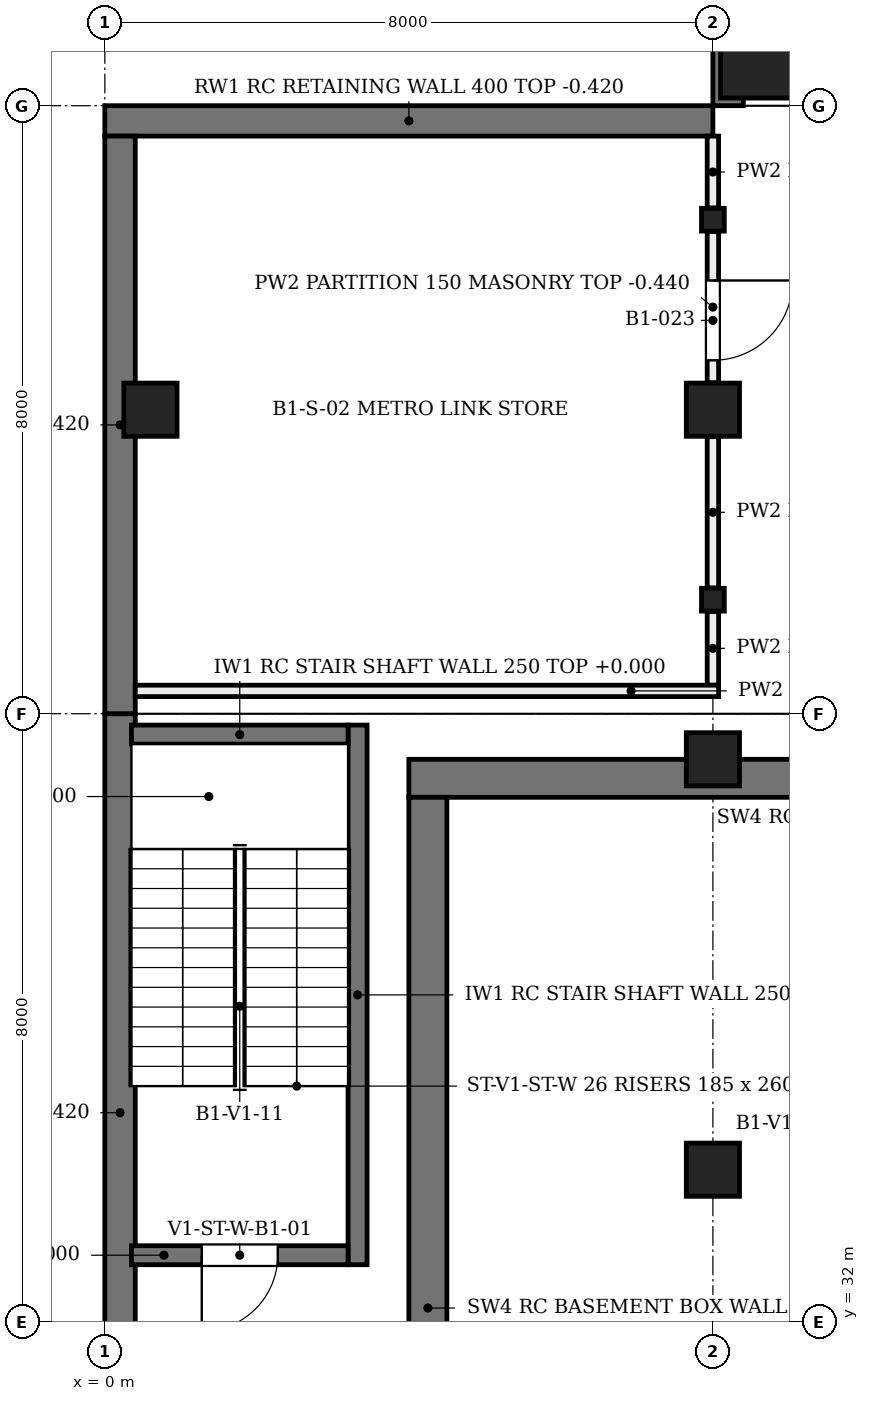
"""IFC4 building model, lengths in metres.
Left out: names, types, materials, properties, quantities, classifications, styles, units other than length and angle.
Written with IfcOpenShell. Run it as: python <this file> out.ifc"""

import sys

from ifc_helpers import new_model, si_unit, direction, frame, frame_2d, origin, origin_2d, place, context, subcontext, project, spatial, rectangle, extrude, element, fill, save


model = new_model("IFC4")
c1 = context("Model", 3, precision=1e-05, world=origin(), true_north=direction((0.0, 1.0)))
c2 = subcontext(c1, "Body", "Model", "MODEL_VIEW")
j1 = project(units=[si_unit("LENGTHUNIT", "METRE"), si_unit("PLANEANGLEUNIT", "RADIAN")], contexts=[c1])
p1 = place(None, origin())
s1 = spatial("IfcSite", under=j1, at=p1, CompositionType="ELEMENT")
p2 = place(p1, origin())
s2 = spatial("IfcBuilding", under=s1, at=p2, CompositionType="ELEMENT")
p3 = place(p2, frame((0.0, 0.0, -4.8)))
s3 = spatial("IfcBuildingStorey", under=s2, at=p3, CompositionType="ELEMENT", Elevation=-4.8)
p4 = place(p3, frame((4.0, 39.15, 0.0), z_axis=(0.0, 0.0, 1.0), x_axis=(1.0, 0.0, 0.0)))
e1 = element("IfcWall", 1, at=p4, inside=s3, PredefinedType="SHEAR", context=c2, shape_type="SweptSolid", body=[
    extrude(rectangle(XDim=24.0, YDim=0.5, at=frame_2d((12.0, 0.0))), origin(), (0.0, 0.0, 1.0), 4.38),
])
p5 = place(p3, frame((4.25, 16.5, 0.0), z_axis=(0.0, 0.0, 1.0), x_axis=(0.0, 1.0, 0.0)))
e2 = element("IfcWall", 2, at=p5, inside=s3, PredefinedType="SHEAR", context=c2, shape_type="SweptSolid", body=[
    extrude(rectangle(XDim=22.4, YDim=0.5, at=frame_2d((11.2, 0.0))), origin(), (0.0, 0.0, 1.0), 4.38),
])
p6 = place(p5, frame((4.25, 0.0, 0.0)))
e3 = element("IfcOpeningElement", 3, at=p6, cuts=e2, PredefinedType="OPENING", context=c2, shape_type="SweptSolid", body=[
    extrude(rectangle(XDim=1.5, YDim=2.7, at=frame_2d((0.75, 1.35))), frame((0.0, 0.26, 0.0), z_axis=(0.0, -1.0, 0.0), x_axis=(1.0, 0.0, 0.0)), (0.0, 0.0, 1.0), 0.52),
])
p7 = place(p5, frame((12.725, 0.0, 0.0)))
e4 = element("IfcOpeningElement", 4, at=p7, cuts=e2, PredefinedType="OPENING", context=c2, shape_type="SweptSolid", body=[
    extrude(rectangle(XDim=1.2, YDim=2.1, at=frame_2d((0.6, 1.05))), frame((0.0, 0.26, 0.0), z_axis=(0.0, -1.0, 0.0), x_axis=(1.0, 0.0, 0.0)), (0.0, 0.0, 1.0), 0.52),
])
p8 = place(p3, frame((8.6, 48.6, 0.0), z_axis=(0.0, 0.0, 1.0), x_axis=(1.0, 0.0, 0.0)))
e5 = element("IfcColumn", 5, at=p8, inside=s3, PredefinedType="COLUMN", context=c2, shape_type="SweptSolid", body=[
    extrude(rectangle(XDim=1.0, YDim=1.0, at=origin_2d()), origin(), (0.0, 0.0, 1.0), 4.8),
])
p9 = place(p3, frame((0.0, 47.8, 0.0), z_axis=(0.0, 0.0, 1.0), x_axis=(1.0, 0.0, 0.0)))
e6 = element("IfcWall", 6, at=p9, inside=s3, PredefinedType="SOLIDWALL", context=c2, shape_type="SweptSolid", body=[
    extrude(rectangle(XDim=8.0, YDim=0.4, at=frame_2d((4.0, 0.0))), origin(), (0.0, 0.0, 1.0), 4.38),
])
p10 = place(p3, frame((0.2, -1.6, 0.0), z_axis=(0.0, 0.0, 1.0), x_axis=(0.0, 1.0, 0.0)))
e7 = element("IfcWall", 7, at=p10, inside=s3, PredefinedType="SOLIDWALL", context=c2, shape_type="SweptSolid", body=[
    extrude(rectangle(XDim=41.6, YDim=0.4, at=frame_2d((20.8, 0.0))), origin(), (0.0, 0.0, 1.0), 4.38),
])
p11 = place(p3, frame((0.2, 40.0, 0.0), z_axis=(0.0, 0.0, 1.0), x_axis=(0.0, 1.0, 0.0)))
e8 = element("IfcWall", 8, at=p11, inside=s3, PredefinedType="SOLIDWALL", context=c2, shape_type="SweptSolid", body=[
    extrude(rectangle(XDim=7.6, YDim=0.4, at=frame_2d((3.8, 0.0))), origin(), (0.0, 0.0, 1.0), 4.38),
])
p12 = place(p3, frame((8.2, 48.0, 0.0), z_axis=(0.0, 0.0, 1.0), x_axis=(0.0, 1.0, 0.0)))
e9 = element("IfcWall", 9, at=p12, inside=s3, PredefinedType="SOLIDWALL", context=c2, shape_type="SweptSolid", body=[
    extrude(rectangle(XDim=15.6, YDim=0.4, at=frame_2d((7.8, 0.0))), origin(), (0.0, 0.0, 1.0), 4.55),
])
for number, where, z_axis, x_axis in (
    (10, (8.0, 34.0, 0.0), (0.0, 0.0, 1.0), (1.0, 0.0, 0.0)),
    (11, (8.0, 39.4, 0.0), (0.0, 0.0, 1.0), (1.0, 0.0, 0.0)),
    (12, (0.6, 44.0, 0.0), (0.0, 0.0, 1.0), (1.0, 0.0, 0.0)),
    (13, (8.0, 44.0, 0.0), (0.0, 0.0, 1.0), (1.0, 0.0, 0.0)),
):
    element("IfcColumn", number, at=place(p3, frame(where, z_axis=z_axis, x_axis=x_axis)), inside=s3, PredefinedType="COLUMN", context=c2, shape_type="SweptSolid", body=[
        extrude(rectangle(XDim=0.7, YDim=0.7, at=origin_2d()), origin(), (0.0, 0.0, 1.0), 4.38),
    ])
for number, where, z_axis, x_axis in (
    (14, (8.0, 41.5, 0.0), (0.0, 0.0, 1.0), (1.0, 0.0, 0.0)),
    (15, (8.0, 46.5, 0.0), (0.0, 0.0, 1.0), (1.0, 0.0, 0.0)),
):
    element("IfcColumn", number, at=place(p3, frame(where, z_axis=z_axis, x_axis=x_axis)), inside=s3, PredefinedType="COLUMN", context=c2, shape_type="SweptSolid", body=[
        extrude(rectangle(XDim=0.3, YDim=0.3, at=origin_2d()), origin(), (0.0, 0.0, 1.0), 4.38),
    ])
p13 = place(p3, frame((3.325, 32.75, 0.0), z_axis=(0.0, 0.0, 1.0), x_axis=(0.0, 1.0, 0.0)))
e16 = element("IfcWall", 16, at=p13, inside=s3, PredefinedType="SOLIDWALL", context=c2, shape_type="SweptSolid", body=[
    extrude(rectangle(XDim=7.1, YDim=0.25, at=frame_2d((3.55, 0.0))), origin(), (0.0, 0.0, 1.0), 4.8),
])
p14 = place(p3, frame((0.35, 32.875, 0.0), z_axis=(0.0, 0.0, 1.0), x_axis=(1.0, 0.0, 0.0)))
e17 = element("IfcWall", 17, at=p14, inside=s3, PredefinedType="SOLIDWALL", context=c2, shape_type="SweptSolid", body=[
    extrude(rectangle(XDim=2.85, YDim=0.25, at=frame_2d((1.425, 0.0))), origin(), (0.0, 0.0, 1.0), 4.8),
])
p15 = place(p14, frame((0.925, 0.0, 0.0)))
e18 = element("IfcOpeningElement", 18, at=p15, cuts=e17, PredefinedType="OPENING", context=c2, shape_type="SweptSolid", body=[
    extrude(rectangle(XDim=1.0, YDim=2.1, at=frame_2d((0.5, 1.05))), frame((0.0, 0.135, 0.0), z_axis=(0.0, -1.0, 0.0), x_axis=(1.0, 0.0, 0.0)), (0.0, 0.0, 1.0), 0.27),
])
p16 = place(p3, frame((0.35, 39.725, 0.0), z_axis=(0.0, 0.0, 1.0), x_axis=(1.0, 0.0, 0.0)))
e19 = element("IfcWall", 19, at=p16, inside=s3, PredefinedType="SOLIDWALL", context=c2, shape_type="SweptSolid", body=[
    extrude(rectangle(XDim=2.85, YDim=0.25, at=frame_2d((1.425, 0.0))), origin(), (0.0, 0.0, 1.0), 4.8),
])
p17 = place(p3, frame((8.0, 40.375, 0.0), z_axis=(0.0, 0.0, 1.0), x_axis=(0.0, 1.0, 0.0)))
e20 = element("IfcWall", 20, at=p17, inside=s3, PredefinedType="PARTITIONING", context=c2, shape_type="SweptSolid", body=[
    extrude(rectangle(XDim=0.97, YDim=0.15, at=frame_2d((0.485, 0.0))), origin(), (0.0, 0.0, 1.0), 4.36),
])
p18 = place(p3, frame((8.0, 41.655, 0.0), z_axis=(0.0, 0.0, 1.0), x_axis=(0.0, 1.0, 0.0)))
e21 = element("IfcWall", 21, at=p18, inside=s3, PredefinedType="PARTITIONING", context=c2, shape_type="SweptSolid", body=[
    extrude(rectangle(XDim=1.99, YDim=0.15, at=frame_2d((0.995, 0.0))), origin(), (0.0, 0.0, 1.0), 4.36),
])
p19 = place(p3, frame((8.0, 44.355, 0.0), z_axis=(0.0, 0.0, 1.0), x_axis=(0.0, 1.0, 0.0)))
e22 = element("IfcWall", 22, at=p19, inside=s3, PredefinedType="PARTITIONING", context=c2, shape_type="SweptSolid", body=[
    extrude(rectangle(XDim=1.99, YDim=0.15, at=frame_2d((0.995, 0.0))), origin(), (0.0, 0.0, 1.0), 4.36),
])
p20 = place(p19, frame((0.295, 0.0, 0.0)))
e23 = element("IfcOpeningElement", 23, at=p20, cuts=e22, PredefinedType="OPENING", context=c2, shape_type="SweptSolid", body=[
    extrude(rectangle(XDim=1.05, YDim=2.1, at=frame_2d((0.525, 1.05))), frame((0.0, 0.085, 0.0), z_axis=(0.0, -1.0, 0.0), x_axis=(1.0, 0.0, 0.0)), (0.0, 0.0, 1.0), 0.17),
])
p21 = place(p3, frame((8.0, 46.655, 0.0), z_axis=(0.0, 0.0, 1.0), x_axis=(0.0, 1.0, 0.0)))
e24 = element("IfcWall", 24, at=p21, inside=s3, PredefinedType="PARTITIONING", context=c2, shape_type="SweptSolid", body=[
    extrude(rectangle(XDim=0.945, YDim=0.15, at=frame_2d((0.473, 0.0))), origin(), (0.0, 0.0, 1.0), 4.36),
])
p22 = place(p3, frame((0.4, 40.3, 0.0), z_axis=(0.0, 0.0, 1.0), x_axis=(1.0, 0.0, 0.0)))
e25 = element("IfcWall", 25, at=p22, inside=s3, PredefinedType="PARTITIONING", context=c2, shape_type="SweptSolid", body=[
    extrude(rectangle(XDim=7.675, YDim=0.15, at=frame_2d((3.837, 0.0))), origin(), (0.0, 0.0, 1.0), 4.36),
])
p23 = place(p15, frame((1.0, 0.0, 0.0), z_axis=(0.0, 0.0, 1.0), x_axis=(-1.0, 0.0, 0.0)))
e26 = element("IfcDoor", 26, at=p23, inside=s3, OperationType="SINGLE_SWING_LEFT", PredefinedType="DOOR", context=c2, shape_type="SweptSolid", body=[
    extrude(rectangle(XDim=1.0, YDim=2.1, at=frame_2d((0.5, 1.05))), frame((0.0, 0.025, 0.0), z_axis=(0.0, -1.0, 0.0), x_axis=(1.0, 0.0, 0.0)), (0.0, 0.0, 1.0), 0.05),
])
fill(e18, e26)
p24 = place(p20, origin())
e27 = element("IfcDoor", 27, at=p24, inside=s3, OperationType="SINGLE_SWING_RIGHT", PredefinedType="DOOR", context=c2, shape_type="SweptSolid", body=[
    extrude(rectangle(XDim=1.05, YDim=2.1, at=frame_2d((0.525, 1.05))), frame((0.0, 0.025, 0.0), z_axis=(0.0, -1.0, 0.0), x_axis=(1.0, 0.0, 0.0)), (0.0, 0.0, 1.0), 0.05),
])
fill(e23, e27)
save(model, sys.argv[1])
